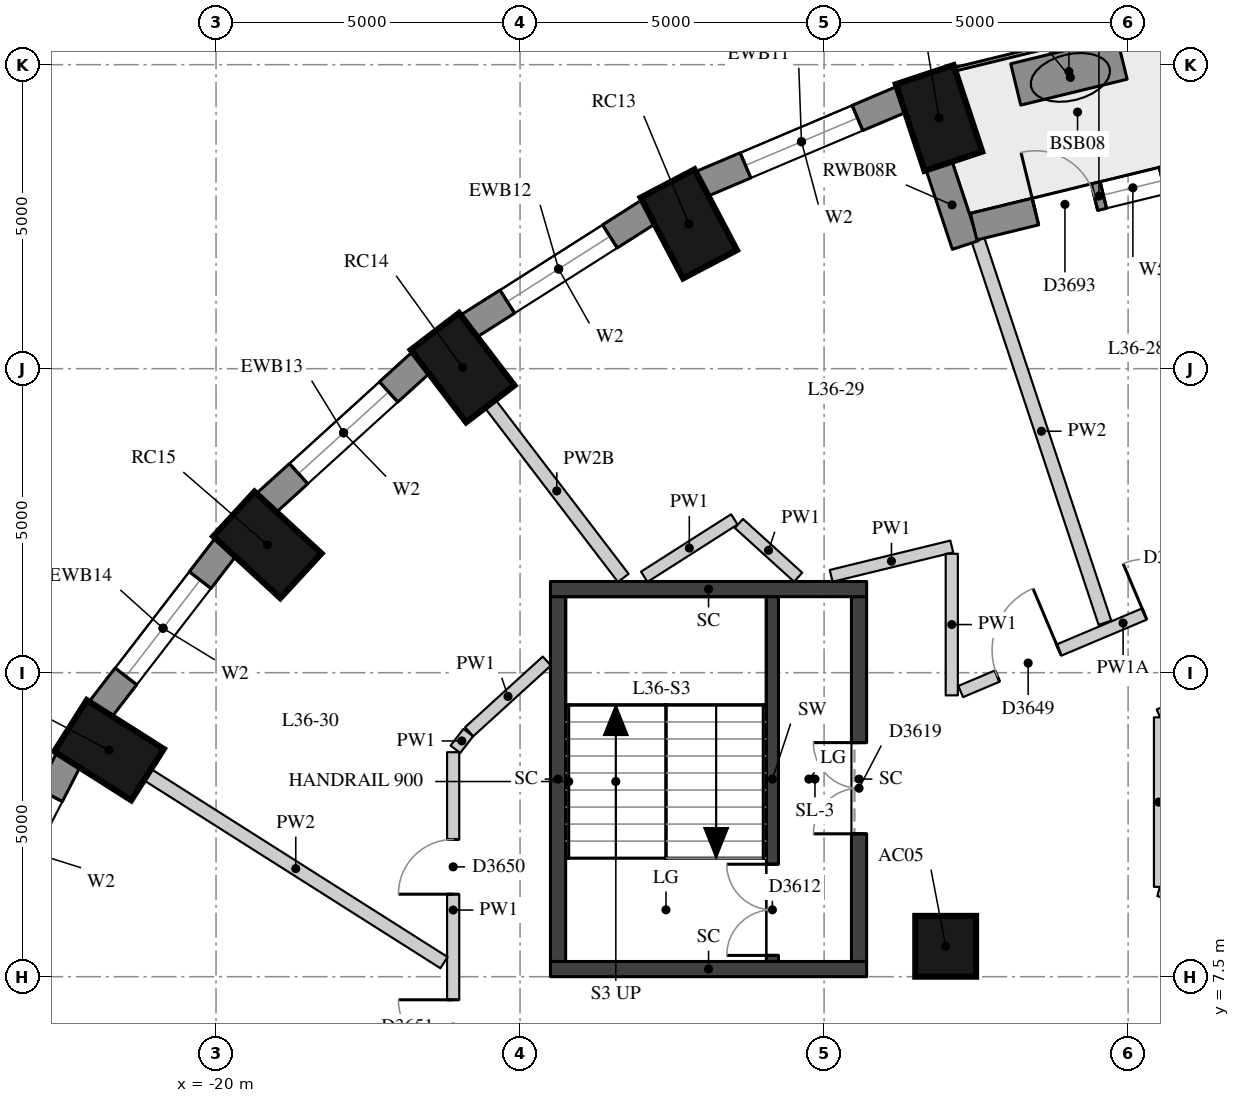
"""IFC4 building model, lengths in metres.
Left out: names, types, materials, properties, quantities, classifications, styles, units other than length and angle.
Written with IfcOpenShell. Run it as: python <this file> out.ifc"""

import sys

from ifc_helpers import new_model, si_unit, direction, frame, frame_2d, origin, origin_2d, place, context, subcontext, project, spatial, rectangle, extrude, element, fill, save


model = new_model("IFC4")
c1 = context("Model", 3, precision=1e-05, world=origin(), true_north=direction((0.0, 1.0)))
c2 = subcontext(c1, "Body", "Model", "MODEL_VIEW")
j1 = project(units=[si_unit("LENGTHUNIT", "METRE"), si_unit("PLANEANGLEUNIT", "RADIAN")], contexts=[c1])
p1 = place(None, origin())
s1 = spatial("IfcSite", under=j1, at=p1, CompositionType="ELEMENT")
p2 = place(p1, origin())
s2 = spatial("IfcBuilding", under=s1, at=p2, CompositionType="ELEMENT")
p3 = place(p2, frame((0.0, 0.0, 128.5)))
s3 = spatial("IfcBuildingStorey", under=s2, at=p3, CompositionType="ELEMENT", Elevation=128.5)
for number, where, z_axis, x_axis in (
    (1, (-8.11, 21.624, 0.0), (0.0, 0.0, 1.0), (-0.315, 0.949, 0.0)),
    (2, (-12.225, 19.882, 0.0), (0.0, 0.0, 1.0), (-0.465, 0.885, 0.0)),
    (3, (-15.945, 17.517, 0.0), (0.0, 0.0, 1.0), (-0.607, 0.795, 0.0)),
    (4, (-19.156, 14.602, 0.0), (0.0, 0.0, 1.0), (-0.735, 0.678, 0.0)),
    (5, (-21.76, 11.225, 0.0), (0.0, 0.0, 1.0), (-0.845, 0.536, 0.0)),
):
    element("IfcColumn", number, at=place(p3, frame(where, z_axis=z_axis, x_axis=x_axis)), inside=s3, PredefinedType="COLUMN", context=c2, shape_type="SweptSolid", body=[
        extrude(rectangle(XDim=1.5, YDim=1.0, at=origin_2d()), origin(), (0.0, 0.0, 1.0), 3.3),
    ])
p4 = place(p3, frame((-8.0, 8.0, 0.0), z_axis=(0.0, 0.0, 1.0), x_axis=(1.0, 0.0, 0.0)))
e6 = element("IfcColumn", 6, at=p4, inside=s3, PredefinedType="COLUMN", context=c2, shape_type="SweptSolid", body=[
    extrude(rectangle(XDim=1.0, YDim=1.0, at=origin_2d()), origin(), (0.0, 0.0, 1.0), 3.3),
])
p5 = place(p3, frame((-8.718, 21.934, 0.0), z_axis=(0.0, 0.0, 1.0), x_axis=(-0.920879975612, -0.389846213932, 0.0)))
e7 = element("IfcWall", 7, at=p5, inside=s3, PredefinedType="SOLIDWALL", context=c2, shape_type="SweptSolid", body=[
    extrude(rectangle(XDim=3.592, YDim=0.45, at=frame_2d((1.796, 0.0))), origin(), (0.0, 0.0, 1.0), 3.02),
])
p6 = place(p5, frame((0.796, 0.0, 0.4)))
e8 = element("IfcOpeningElement", 8, at=p6, cuts=e7, PredefinedType="OPENING", context=c2, shape_type="SweptSolid", body=[
    extrude(rectangle(XDim=2.0, YDim=1.75, at=frame_2d((1.0, 0.875))), frame((0.0, 0.235, 0.0), z_axis=(0.0, -1.0, 0.0), x_axis=(1.0, 0.0, 0.0)), (0.0, 0.0, 1.0), 0.47),
])
p7 = place(p3, frame((-12.875, 20.087, 0.0), z_axis=(0.0, 0.0, 1.0), x_axis=(-0.843860651879, -0.536562391722, 0.0)))
e9 = element("IfcWall", 9, at=p7, inside=s3, PredefinedType="SOLIDWALL", context=c2, shape_type="SweptSolid", body=[
    extrude(rectangle(XDim=3.532, YDim=0.45, at=frame_2d((1.766, 0.0))), origin(), (0.0, 0.0, 1.0), 3.02),
])
p8 = place(p7, frame((0.766, 0.0, 0.4)))
e10 = element("IfcOpeningElement", 10, at=p8, cuts=e9, PredefinedType="OPENING", context=c2, shape_type="SweptSolid", body=[
    extrude(rectangle(XDim=2.0, YDim=1.75, at=frame_2d((1.0, 0.875))), frame((0.0, 0.235, 0.0), z_axis=(0.0, -1.0, 0.0), x_axis=(1.0, 0.0, 0.0)), (0.0, 0.0, 1.0), 0.47),
])
p9 = place(p3, frame((-16.62, 17.61, 0.0), z_axis=(0.0, 0.0, 1.0), x_axis=(-0.74032902847, -0.672244694739, 0.0)))
e11 = element("IfcWall", 11, at=p9, inside=s3, PredefinedType="SOLIDWALL", context=c2, shape_type="SweptSolid", body=[
    extrude(rectangle(XDim=3.464, YDim=0.45, at=frame_2d((1.732, 0.0))), origin(), (0.0, 0.0, 1.0), 3.02),
])
p10 = place(p9, frame((0.732, 0.0, 0.4)))
e12 = element("IfcOpeningElement", 12, at=p10, cuts=e11, PredefinedType="OPENING", context=c2, shape_type="SweptSolid", body=[
    extrude(rectangle(XDim=2.0, YDim=1.75, at=frame_2d((1.0, 0.875))), frame((0.0, 0.235, 0.0), z_axis=(0.0, -1.0, 0.0), x_axis=(1.0, 0.0, 0.0)), (0.0, 0.0, 1.0), 0.47),
])
p11 = place(p3, frame((-19.835, 14.575, 0.0), z_axis=(0.0, 0.0, 1.0), x_axis=(-0.610693945156, -0.791866721961, 0.0)))
e13 = element("IfcWall", 13, at=p11, inside=s3, PredefinedType="SOLIDWALL", context=c2, shape_type="SweptSolid", body=[
    extrude(rectangle(XDim=3.395, YDim=0.45, at=frame_2d((1.697, 0.0))), origin(), (0.0, 0.0, 1.0), 3.02),
])
p12 = place(p11, frame((0.697, 0.0, 0.4)))
e14 = element("IfcOpeningElement", 14, at=p12, cuts=e13, PredefinedType="OPENING", context=c2, shape_type="SweptSolid", body=[
    extrude(rectangle(XDim=2.0, YDim=1.75, at=frame_2d((1.0, 0.875))), frame((0.0, 0.235, 0.0), z_axis=(0.0, -1.0, 0.0), x_axis=(1.0, 0.0, 0.0)), (0.0, 0.0, 1.0), 0.47),
])
p13 = place(p3, frame((-22.423, 11.077, 0.0), z_axis=(0.0, 0.0, 1.0), x_axis=(-0.456828186229, -0.889554949549, 0.0)))
e15 = element("IfcWall", 15, at=p13, inside=s3, PredefinedType="SOLIDWALL", context=c2, shape_type="SweptSolid", body=[
    extrude(rectangle(XDim=3.333, YDim=0.45, at=frame_2d((1.667, 0.0))), origin(), (0.0, 0.0, 1.0), 3.02),
])
p14 = place(p13, frame((0.666, 0.0, 0.4)))
e16 = element("IfcOpeningElement", 16, at=p14, cuts=e15, PredefinedType="OPENING", context=c2, shape_type="SweptSolid", body=[
    extrude(rectangle(XDim=2.0, YDim=1.75, at=frame_2d((1.0, 0.875))), frame((0.0, 0.235, 0.0), z_axis=(0.0, -1.0, 0.0), x_axis=(1.0, 0.0, 0.0)), (0.0, 0.0, 1.0), 0.47),
])
p15 = place(p3, frame((-8.114, 20.853, 0.0), z_axis=(0.0, 0.0, 1.0), x_axis=(0.314488854508, -0.949261165534, 0.0)))
e17 = element("IfcWall", 17, at=p15, inside=s3, PredefinedType="SOLIDWALL", context=c2, shape_type="SweptSolid", body=[
    extrude(rectangle(XDim=1.39, YDim=0.45, at=frame_2d((0.695, 0.0))), origin(), (0.0, 0.0, 1.0), 3.02),
])
p16 = place(p3, frame((-3.42, 20.841, 0.0), z_axis=(0.0, 0.0, 1.0), x_axis=(-0.971511611373, -0.23699195971, 0.0)))
e18 = element("IfcWall", 18, at=p16, inside=s3, PredefinedType="SOLIDWALL", context=c2, shape_type="SweptSolid", body=[
    extrude(rectangle(XDim=4.241, YDim=0.45, at=frame_2d((2.121, 0.0))), origin(), (0.0, 0.0, 1.0), 3.02),
])
p17 = place(p16, frame((1.045, 0.0, 0.4)))
e19 = element("IfcOpeningElement", 19, at=p17, cuts=e18, PredefinedType="OPENING", context=c2, shape_type="SweptSolid", body=[
    extrude(rectangle(XDim=1.0, YDim=1.75, at=frame_2d((0.5, 0.875))), frame((0.0, 0.235, 0.0), z_axis=(0.0, -1.0, 0.0), x_axis=(1.0, 0.0, 0.0)), (0.0, 0.0, 1.0), 0.47),
])
p18 = place(p16, frame((2.196, 0.0, 0.0)))
e20 = element("IfcOpeningElement", 20, at=p18, cuts=e18, PredefinedType="OPENING", context=c2, shape_type="SweptSolid", body=[
    extrude(rectangle(XDim=1.0, YDim=2.15, at=frame_2d((0.5, 1.075))), frame((0.0, 0.235, 0.0), z_axis=(0.0, -1.0, 0.0), x_axis=(1.0, 0.0, 0.0)), (0.0, 0.0, 1.0), 0.47),
])
p19 = place(p3, frame((-5.099, 22.601, 0.0), z_axis=(0.0, 0.0, 1.0), x_axis=(-0.971654974133, -0.23640349245, 0.0)))
e21 = element("IfcWall", 21, at=p19, inside=s3, PredefinedType="USERDEFINED", context=c2, shape_type="SweptSolid", body=[
    extrude(rectangle(XDim=1.8, YDim=0.7, at=frame_2d((0.9, 0.0))), origin(), (0.0, 0.0, 1.0), 0.75),
])
p20 = place(p3, frame((-10.85, 7.75, 0.0), z_axis=(0.0, 0.0, 1.0), x_axis=(0.0, 1.0, 0.0)))
e22 = element("IfcWall", 22, at=p20, inside=s3, PredefinedType="SHEAR", context=c2, shape_type="SweptSolid", body=[
    extrude(rectangle(XDim=6.0, YDim=0.2, at=frame_2d((3.0, 0.0))), origin(), (0.0, 0.0, 1.0), 3.02),
])
p21 = place(p20, frame((0.1, 0.0, 0.0)))
e23 = element("IfcOpeningElement", 23, at=p21, cuts=e22, PredefinedType="OPENING", context=c2, shape_type="SweptSolid", body=[
    extrude(rectangle(XDim=1.5, YDim=2.1, at=frame_2d((0.75, 1.05))), frame((0.0, 0.11, 0.0), z_axis=(0.0, -1.0, 0.0), x_axis=(1.0, 0.0, 0.0)), (0.0, 0.0, 1.0), 0.22),
])
p22 = place(p3, frame((-14.375, 7.75, -0.28), z_axis=(0.0, 0.0, 1.0), x_axis=(0.0, 1.0, 0.0)))
e24 = element("IfcWall", 24, at=p22, inside=s3, PredefinedType="SHEAR", context=c2, shape_type="SweptSolid", body=[
    extrude(rectangle(XDim=6.0, YDim=0.25, at=frame_2d((3.0, 0.0))), origin(), (0.0, 0.0, 1.0), 3.3),
])
p23 = place(p3, frame((-9.425, 7.75, -0.28), z_axis=(0.0, 0.0, 1.0), x_axis=(0.0, 1.0, 0.0)))
e25 = element("IfcWall", 25, at=p23, inside=s3, PredefinedType="SHEAR", context=c2, shape_type="SweptSolid", body=[
    extrude(rectangle(XDim=6.0, YDim=0.25, at=frame_2d((3.0, 0.0))), origin(), (0.0, 0.0, 1.0), 3.3),
])
p24 = place(p23, frame((2.1, 0.0, 0.28)))
e26 = element("IfcOpeningElement", 26, at=p24, cuts=e25, PredefinedType="OPENING", context=c2, shape_type="SweptSolid", body=[
    extrude(rectangle(XDim=1.5, YDim=2.1, at=frame_2d((0.75, 1.05))), frame((0.0, 0.135, 0.0), z_axis=(0.0, -1.0, 0.0), x_axis=(1.0, 0.0, 0.0)), (0.0, 0.0, 1.0), 0.27),
])
for number, where, z_axis, x_axis in (
    (27, (-14.5, 13.875, -0.28), (0.0, 0.0, 1.0), (1.0, 0.0, 0.0)),
    (28, (-14.5, 7.625, -0.28), (0.0, 0.0, 1.0), (1.0, 0.0, 0.0)),
):
    element("IfcWall", number, at=place(p3, frame(where, z_axis=z_axis, x_axis=x_axis)), inside=s3, PredefinedType="SHEAR", context=c2, shape_type="SweptSolid", body=[
        extrude(rectangle(XDim=5.2, YDim=0.25, at=frame_2d((2.6, 0.0))), origin(), (0.0, 0.0, 1.0), 3.3),
    ])
p25 = place(p3, frame((-16.1, 6.0, 0.0), z_axis=(0.0, 0.0, 1.0), x_axis=(0.0, 1.0, 0.0)))
e29 = element("IfcWall", 29, at=p25, inside=s3, PredefinedType="PARTITIONING", context=c2, shape_type="SweptSolid", body=[
    extrude(rectangle(XDim=5.192, YDim=0.2, at=frame_2d((2.596, 0.0))), origin(), (0.0, 0.0, 1.0), 3.02),
])
p26 = place(p25, frame((2.857, 0.0, 0.0)))
e30 = element("IfcOpeningElement", 30, at=p26, cuts=e29, PredefinedType="OPENING", context=c2, shape_type="SweptSolid", body=[
    extrude(rectangle(XDim=0.9, YDim=2.1, at=frame_2d((0.45, 1.05))), frame((0.0, 0.11, 0.0), z_axis=(0.0, -1.0, 0.0), x_axis=(1.0, 0.0, 0.0)), (0.0, 0.0, 1.0), 0.22),
])
p27 = place(p25, frame((0.22, 0.0, 0.0)))
e31 = element("IfcOpeningElement", 31, at=p27, cuts=e29, PredefinedType="OPENING", context=c2, shape_type="SweptSolid", body=[
    extrude(rectangle(XDim=0.9, YDim=2.1, at=frame_2d((0.45, 1.05))), frame((0.0, 0.11, 0.0), z_axis=(0.0, -1.0, 0.0), x_axis=(1.0, 0.0, 0.0)), (0.0, 0.0, 1.0), 0.22),
])
p28 = place(p3, frame((-16.063, 11.24, 0.0), z_axis=(0.0, 0.0, 1.0), x_axis=(0.609744747854, 0.792597844096, 0.0)))
e32 = element("IfcWall", 32, at=p28, inside=s3, PredefinedType="PARTITIONING", context=c2, shape_type="SweptSolid", body=[
    extrude(rectangle(XDim=0.347, YDim=0.2, at=frame_2d((0.174, 0.0))), origin(), (0.0, 0.0, 1.0), 3.02),
])
p29 = place(p3, frame((-15.837, 11.528, 0.0), z_axis=(0.0, 0.0, 1.0), x_axis=(0.739402681643, 0.673263450946, 0.0)))
e33 = element("IfcWall", 33, at=p29, inside=s3, PredefinedType="PARTITIONING", context=c2, shape_type="SweptSolid", body=[
    extrude(rectangle(XDim=1.728, YDim=0.2, at=frame_2d((0.864, 0.0))), origin(), (0.0, 0.0, 1.0), 3.02),
])
p30 = place(p3, frame((-12.957, 14.077, 0.0), z_axis=(0.0, 0.0, 1.0), x_axis=(0.843226410818, 0.537558573645, 0.0)))
e34 = element("IfcWall", 34, at=p30, inside=s3, PredefinedType="PARTITIONING", context=c2, shape_type="SweptSolid", body=[
    extrude(rectangle(XDim=1.757, YDim=0.2, at=frame_2d((0.878, 0.0))), origin(), (0.0, 0.0, 1.0), 3.02),
])
p31 = place(p3, frame((-11.401, 14.955, 0.0), z_axis=(0.0, 0.0, 1.0), x_axis=(0.740594498135, -0.671952222507, 0.0)))
e35 = element("IfcWall", 35, at=p31, inside=s3, PredefinedType="PARTITIONING", context=c2, shape_type="SweptSolid", body=[
    extrude(rectangle(XDim=1.316, YDim=0.2, at=frame_2d((0.658, 0.0))), origin(), (0.0, 0.0, 1.0), 3.02),
])
p32 = place(p3, frame((-9.884, 14.092, 0.0), z_axis=(0.0, 0.0, 1.0), x_axis=(0.971512281799, 0.236989211388, 0.0)))
e36 = element("IfcWall", 36, at=p32, inside=s3, PredefinedType="PARTITIONING", context=c2, shape_type="SweptSolid", body=[
    extrude(rectangle(XDim=2.042, YDim=0.2, at=frame_2d((1.021, 0.0))), origin(), (0.0, 0.0, 1.0), 3.02),
])
p33 = place(p3, frame((-7.9, 14.456, 0.0), z_axis=(0.0, 0.0, 1.0), x_axis=(0.0, -1.0, 0.0)))
e37 = element("IfcWall", 37, at=p33, inside=s3, PredefinedType="PARTITIONING", context=c2, shape_type="SweptSolid", body=[
    extrude(rectangle(XDim=2.328, YDim=0.2, at=frame_2d((1.164, 0.0))), origin(), (0.0, 0.0, 1.0), 3.02),
])
p34 = place(p3, frame((-7.753, 12.19, 0.0), z_axis=(0.0, 0.0, 1.0), x_axis=(0.921319622993, 0.388806059994, 0.0)))
e38 = element("IfcWall", 38, at=p34, inside=s3, PredefinedType="PARTITIONING", context=c2, shape_type="SweptSolid", body=[
    extrude(rectangle(XDim=5.798, YDim=0.2, at=frame_2d((2.899, 0.0))), origin(), (0.0, 0.0, 1.0), 2.57),
])
p35 = place(p34, frame((3.28, 0.0, 0.0)))
e39 = element("IfcOpeningElement", 39, at=p35, cuts=e38, PredefinedType="OPENING", context=c2, shape_type="SweptSolid", body=[
    extrude(rectangle(XDim=0.9, YDim=2.1, at=frame_2d((0.45, 1.05))), frame((0.0, 0.11, 0.0), z_axis=(0.0, -1.0, 0.0), x_axis=(1.0, 0.0, 0.0)), (0.0, 0.0, 1.0), 0.22),
])
p36 = place(p34, frame((0.654, 0.0, 0.0)))
e40 = element("IfcOpeningElement", 40, at=p36, cuts=e38, PredefinedType="OPENING", context=c2, shape_type="SweptSolid", body=[
    extrude(rectangle(XDim=1.1, YDim=2.1, at=frame_2d((0.55, 1.05))), frame((0.0, 0.11, 0.0), z_axis=(0.0, -1.0, 0.0), x_axis=(1.0, 0.0, 0.0)), (0.0, 0.0, 1.0), 0.22),
])
p37 = place(p3, frame((-4.5, 11.826, 0.0), z_axis=(0.0, 0.0, 1.0), x_axis=(0.921264033472, 0.388937759329, 0.0)))
e41 = element("IfcWall", 41, at=p37, inside=s3, PredefinedType="PARTITIONING", context=c2, shape_type="SweptSolid", body=[
    extrude(rectangle(XDim=2.552, YDim=0.15, at=frame_2d((1.276, 0.0))), origin(), (0.0, 0.0, 1.0), 3.02),
])
p38 = place(p37, frame((0.826, 0.0, 0.0)))
e42 = element("IfcOpeningElement", 42, at=p38, cuts=e41, PredefinedType="OPENING", context=c2, shape_type="SweptSolid", body=[
    extrude(rectangle(XDim=0.9, YDim=2.1, at=frame_2d((0.45, 1.05))), frame((0.0, 0.085, 0.0), z_axis=(0.0, -1.0, 0.0), x_axis=(1.0, 0.0, 0.0)), (0.0, 0.0, 1.0), 0.17),
])
p39 = place(p3, frame((-3.121, 8.528, 0.0), z_axis=(0.0, 0.0, 1.0), x_axis=(-0.965941945062, 0.258758881529, 0.0)))
e43 = element("IfcWall", 43, at=p39, inside=s3, PredefinedType="PARTITIONING", context=c2, shape_type="SweptSolid", body=[
    extrude(rectangle(XDim=1.427, YDim=0.15, at=frame_2d((0.714, 0.0))), origin(), (0.0, 0.0, 1.0), 2.47),
])
p40 = place(p3, frame((-4.5, 8.977, 0.0), z_axis=(0.0, 0.0, 1.0), x_axis=(0.0, 1.0, 0.0)))
e44 = element("IfcWall", 44, at=p40, inside=s3, PredefinedType="PARTITIONING", context=c2, shape_type="SweptSolid", body=[
    extrude(rectangle(XDim=2.789, YDim=0.15, at=frame_2d((1.394, 0.0))), origin(), (0.0, 0.0, 1.0), 3.02),
])
p41 = place(p3, frame((-7.469, 19.622, 0.0), z_axis=(0.0, 0.0, 1.0), x_axis=(0.314539081996, -0.949244523765, 0.0)))
e45 = element("IfcWall", 45, at=p41, inside=s3, PredefinedType="PARTITIONING", context=c2, shape_type="SweptSolid", body=[
    extrude(rectangle(XDim=6.638, YDim=0.22, at=frame_2d((3.319, 0.0))), origin(), (0.0, 0.0, 1.0), 3.02),
])
p42 = place(p3, frame((-15.489, 16.921, 0.0), z_axis=(0.0, 0.0, 1.0), x_axis=(0.607057591547, -0.794657838661, 0.0)))
e46 = element("IfcWall", 46, at=p42, inside=s3, PredefinedType="PARTITIONING", context=c2, shape_type="SweptSolid", body=[
    extrude(rectangle(XDim=3.602, YDim=0.22, at=frame_2d((1.801, 0.0))), origin(), (0.0, 0.0, 1.0), 2.57),
])
p43 = place(p3, frame((-21.126, 10.823, 0.0), z_axis=(0.0, 0.0, 1.0), x_axis=(0.844518840625, -0.535525842355, 0.0)))
e47 = element("IfcWall", 47, at=p43, inside=s3, PredefinedType="PARTITIONING", context=c2, shape_type="SweptSolid", body=[
    extrude(rectangle(XDim=5.773, YDim=0.22, at=frame_2d((2.887, 0.0))), origin(), (0.0, 0.0, 1.0), 3.02),
])
p44 = place(p6, origin())
e48 = element("IfcWindow", 48, at=p44, inside=s3, PartitioningType="SINGLE_PANEL", PredefinedType="WINDOW", context=c2, shape_type="SweptSolid", body=[
    extrude(rectangle(XDim=2.0, YDim=1.75, at=frame_2d((1.0, 0.875))), frame((0.0, 0.035, 0.0), z_axis=(0.0, -1.0, 0.0), x_axis=(1.0, 0.0, 0.0)), (0.0, 0.0, 1.0), 0.06),
])
fill(e8, e48)
p45 = place(p8, origin())
e49 = element("IfcWindow", 49, at=p45, inside=s3, PartitioningType="SINGLE_PANEL", PredefinedType="WINDOW", context=c2, shape_type="SweptSolid", body=[
    extrude(rectangle(XDim=2.0, YDim=1.75, at=frame_2d((1.0, 0.875))), frame((0.0, 0.035, 0.0), z_axis=(0.0, -1.0, 0.0), x_axis=(1.0, 0.0, 0.0)), (0.0, 0.0, 1.0), 0.06),
])
fill(e10, e49)
p46 = place(p10, origin())
e50 = element("IfcWindow", 50, at=p46, inside=s3, PartitioningType="SINGLE_PANEL", PredefinedType="WINDOW", context=c2, shape_type="SweptSolid", body=[
    extrude(rectangle(XDim=2.0, YDim=1.75, at=frame_2d((1.0, 0.875))), frame((0.0, 0.035, 0.0), z_axis=(0.0, -1.0, 0.0), x_axis=(1.0, 0.0, 0.0)), (0.0, 0.0, 1.0), 0.06),
])
fill(e12, e50)
p47 = place(p12, origin())
e51 = element("IfcWindow", 51, at=p47, inside=s3, PartitioningType="SINGLE_PANEL", PredefinedType="WINDOW", context=c2, shape_type="SweptSolid", body=[
    extrude(rectangle(XDim=2.0, YDim=1.75, at=frame_2d((1.0, 0.875))), frame((0.0, 0.035, 0.0), z_axis=(0.0, -1.0, 0.0), x_axis=(1.0, 0.0, 0.0)), (0.0, 0.0, 1.0), 0.06),
])
fill(e14, e51)
p48 = place(p14, origin())
e52 = element("IfcWindow", 52, at=p48, inside=s3, PartitioningType="SINGLE_PANEL", PredefinedType="WINDOW", context=c2, shape_type="SweptSolid", body=[
    extrude(rectangle(XDim=2.0, YDim=1.75, at=frame_2d((1.0, 0.875))), frame((0.0, 0.035, 0.0), z_axis=(0.0, -1.0, 0.0), x_axis=(1.0, 0.0, 0.0)), (0.0, 0.0, 1.0), 0.06),
])
fill(e16, e52)
p49 = place(p17, origin())
e53 = element("IfcWindow", 53, at=p49, inside=s3, PartitioningType="SINGLE_PANEL", PredefinedType="WINDOW", context=c2, shape_type="SweptSolid", body=[
    extrude(rectangle(XDim=1.0, YDim=1.75, at=frame_2d((0.5, 0.875))), frame((0.0, 0.035, 0.0), z_axis=(0.0, -1.0, 0.0), x_axis=(1.0, 0.0, 0.0)), (0.0, 0.0, 1.0), 0.06),
])
fill(e19, e53)
p50 = place(p18, frame((1.0, 0.0, 0.0), z_axis=(0.0, 0.0, 1.0), x_axis=(-1.0, 0.0, 0.0)))
e54 = element("IfcDoor", 54, at=p50, inside=s3, OperationType="SINGLE_SWING_LEFT", PredefinedType="DOOR", context=c2, shape_type="SweptSolid", body=[
    extrude(rectangle(XDim=1.0, YDim=2.15, at=frame_2d((0.5, 1.075))), frame((0.0, 0.075, 0.0), z_axis=(0.0, -1.0, 0.0), x_axis=(1.0, 0.0, 0.0)), (0.0, 0.0, 1.0), 0.05),
])
fill(e20, e54)
p51 = place(p21, origin())
e55 = element("IfcDoor", 55, at=p51, inside=s3, OperationType="DOUBLE_DOOR_SINGLE_SWING", PredefinedType="DOOR", context=c2, shape_type="SweptSolid", body=[
    extrude(rectangle(XDim=1.5, YDim=2.1, at=frame_2d((0.75, 1.05))), frame((0.0, 0.025, 0.0), z_axis=(0.0, -1.0, 0.0), x_axis=(1.0, 0.0, 0.0)), (0.0, 0.0, 1.0), 0.05),
])
fill(e23, e55)
p52 = place(p24, origin())
e56 = element("IfcDoor", 56, at=p52, inside=s3, OperationType="DOUBLE_DOOR_SINGLE_SWING", PredefinedType="DOOR", context=c2, shape_type="SweptSolid", body=[
    extrude(rectangle(XDim=1.5, YDim=2.1, at=frame_2d((0.75, 1.05))), frame((0.0, 0.025, 0.0), z_axis=(0.0, -1.0, 0.0), x_axis=(1.0, 0.0, 0.0)), (0.0, 0.0, 1.0), 0.05),
])
fill(e26, e56)
p53 = place(p35, origin())
e57 = element("IfcDoor", 57, at=p53, inside=s3, OperationType="SINGLE_SWING_LEFT", PredefinedType="DOOR", context=c2, shape_type="SweptSolid", body=[
    extrude(rectangle(XDim=0.9, YDim=2.1, at=frame_2d((0.45, 1.05))), frame((0.0, 0.025, 0.0), z_axis=(0.0, -1.0, 0.0), x_axis=(1.0, 0.0, 0.0)), (0.0, 0.0, 1.0), 0.05),
])
fill(e39, e57)
p54 = place(p36, origin())
e58 = element("IfcDoor", 58, at=p54, inside=s3, OperationType="SINGLE_SWING_RIGHT", PredefinedType="DOOR", context=c2, shape_type="SweptSolid", body=[
    extrude(rectangle(XDim=1.1, YDim=2.1, at=frame_2d((0.55, 1.05))), frame((0.0, 0.025, 0.0), z_axis=(0.0, -1.0, 0.0), x_axis=(1.0, 0.0, 0.0)), (0.0, 0.0, 1.0), 0.05),
])
fill(e40, e58)
p55 = place(p26, origin())
e59 = element("IfcDoor", 59, at=p55, inside=s3, OperationType="SINGLE_SWING_LEFT", PredefinedType="DOOR", context=c2, shape_type="SweptSolid", body=[
    extrude(rectangle(XDim=0.9, YDim=2.1, at=frame_2d((0.45, 1.05))), frame((0.0, 0.025, 0.0), z_axis=(0.0, -1.0, 0.0), x_axis=(1.0, 0.0, 0.0)), (0.0, 0.0, 1.0), 0.05),
])
fill(e30, e59)
p56 = place(p27, origin())
e60 = element("IfcDoor", 60, at=p56, inside=s3, OperationType="SINGLE_SWING_RIGHT", PredefinedType="DOOR", context=c2, shape_type="SweptSolid", body=[
    extrude(rectangle(XDim=0.9, YDim=2.1, at=frame_2d((0.45, 1.05))), frame((0.0, 0.025, 0.0), z_axis=(0.0, -1.0, 0.0), x_axis=(1.0, 0.0, 0.0)), (0.0, 0.0, 1.0), 0.05),
])
fill(e31, e60)
save(model, sys.argv[1])
